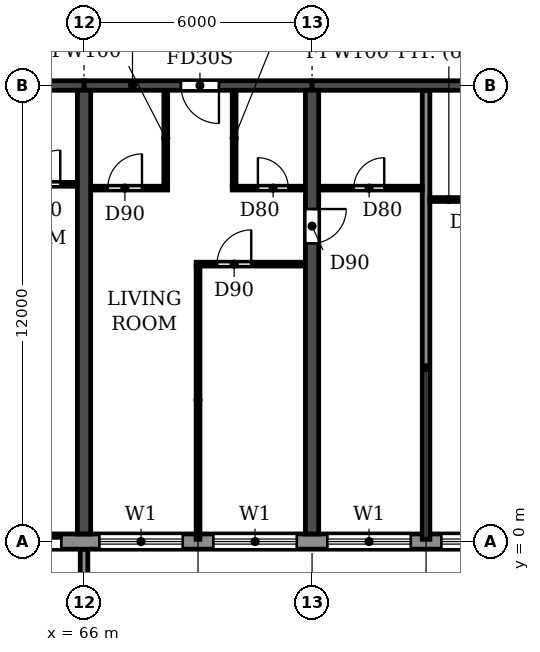
"""IFC4 building model, lengths in metres.
Left out: names, types, materials, properties, quantities, classifications, styles, units other than length and angle.
Written with IfcOpenShell. Run it as: python <this file> out.ifc"""

import sys

from ifc_helpers import new_model, si_unit, direction, frame, frame_2d, origin, place, context, subcontext, project, spatial, polyline, rectangle, outline, extrude, source, transform, mapped, element, fill, save


model = new_model("IFC4")
c1 = context("Model", 3, precision=1e-05, world=origin(), true_north=direction((0.0, 1.0)))
c2 = subcontext(c1, "Body", "Model", "MODEL_VIEW")
j1 = project(units=[si_unit("LENGTHUNIT", "METRE"), si_unit("PLANEANGLEUNIT", "RADIAN")], contexts=[c1])
p1 = place(None, origin())
s1 = spatial("IfcSite", under=j1, at=p1, CompositionType="ELEMENT")
p2 = place(p1, origin())
s2 = spatial("IfcBuilding", under=s1, at=p2, CompositionType="ELEMENT")
p3 = place(p2, frame((0.0, 0.0, 109.2)))
s3 = spatial("IfcBuildingStorey", under=s2, at=p3, CompositionType="ELEMENT", Elevation=109.2)
p4 = place(p3, frame((66.0, 0.2, 0.0), z_axis=(0.0, 0.0, 1.0), x_axis=(0.0, 1.0, 0.0)))
e1 = element("IfcWall", 1, at=p4, inside=s3, PredefinedType="SHEAR", context=c2, shape_type="SweptSolid", body=[
    extrude(rectangle(XDim=11.675, YDim=0.35, at=frame_2d((5.837, 0.0))), origin(), (0.0, 0.0, 1.0), 3.06),
])
p5 = place(p3, frame((72.0, 0.2, 0.0), z_axis=(0.0, 0.0, 1.0), x_axis=(0.0, 1.0, 0.0)))
e2 = element("IfcWall", 2, at=p5, inside=s3, PredefinedType="SHEAR", context=c2, shape_type="SweptSolid", body=[
    extrude(rectangle(XDim=11.675, YDim=0.35, at=frame_2d((5.837, 0.0))), origin(), (0.0, 0.0, 1.0), 3.06),
])
p6 = place(p5, frame((7.65, 0.0, 0.0)))
e3 = element("IfcOpeningElement", 3, at=p6, cuts=e2, PredefinedType="OPENING", context=c2, shape_type="SweptSolid", body=[
    extrude(rectangle(XDim=0.9, YDim=2.1, at=frame_2d((0.45, 1.05))), frame((0.0, 0.185, 0.0), z_axis=(0.0, -1.0, 0.0), x_axis=(1.0, 0.0, 0.0)), (0.0, 0.0, 1.0), 0.37),
])
p7 = place(p3, frame((60.0, 12.0, 0.0), z_axis=(0.0, 0.0, 1.0), x_axis=(1.0, 0.0, 0.0)))
e4 = element("IfcWall", 4, at=p7, inside=s3, PredefinedType="SHEAR", context=c2, shape_type="SweptSolid", body=[
    extrude(rectangle(XDim=6.0, YDim=0.25, at=frame_2d((3.0, 0.0))), origin(), (0.0, 0.0, 1.0), 2.46),
])
p8 = place(p7, frame((2.45, 0.0, 0.0)))
e5 = element("IfcOpeningElement", 5, at=p8, cuts=e4, PredefinedType="OPENING", context=c2, shape_type="SweptSolid", body=[
    extrude(rectangle(XDim=1.0, YDim=2.1, at=frame_2d((0.5, 1.05))), frame((0.0, 0.135, 0.0), z_axis=(0.0, -1.0, 0.0), x_axis=(1.0, 0.0, 0.0)), (0.0, 0.0, 1.0), 0.27),
])
p9 = place(p3, frame((66.0, 12.0, 0.0), z_axis=(0.0, 0.0, 1.0), x_axis=(1.0, 0.0, 0.0)))
e6 = element("IfcWall", 6, at=p9, inside=s3, PredefinedType="SHEAR", context=c2, shape_type="SweptSolid", body=[
    extrude(rectangle(XDim=6.0, YDim=0.25, at=frame_2d((3.0, 0.0))), origin(), (0.0, 0.0, 1.0), 2.46),
])
p10 = place(p9, frame((2.55, 0.0, 0.0)))
e7 = element("IfcOpeningElement", 7, at=p10, cuts=e6, PredefinedType="OPENING", context=c2, shape_type="SweptSolid", body=[
    extrude(rectangle(XDim=1.0, YDim=2.1, at=frame_2d((0.5, 1.05))), frame((0.0, 0.135, 0.0), z_axis=(0.0, -1.0, 0.0), x_axis=(1.0, 0.0, 0.0)), (0.0, 0.0, 1.0), 0.27),
])
p11 = place(p3, frame((72.0, 12.0, 0.0), z_axis=(0.0, 0.0, 1.0), x_axis=(1.0, 0.0, 0.0)))
e8 = element("IfcWall", 8, at=p11, inside=s3, PredefinedType="SHEAR", context=c2, shape_type="SweptSolid", body=[
    extrude(rectangle(XDim=6.0, YDim=0.25, at=frame_2d((3.0, 0.0))), origin(), (0.0, 0.0, 1.0), 2.46),
])
p12 = place(p3, frame((16.683, 0.0, 0.0), z_axis=(0.0, 0.0, 1.0), x_axis=(1.0, 0.0, 0.0)))
e9 = element("IfcWall", 9, at=p12, inside=s3, PredefinedType="STANDARD", context=c2, shape_type="SweptSolid", body=[
    extrude(rectangle(XDim=68.634, YDim=0.4, at=frame_2d((34.317, 0.0))), origin(), (0.0, 0.0, 1.0), 3.06),
])
p13 = place(p12, frame((1.717, 0.0, 0.9)))
e10 = element("IfcOpeningElement", 10, at=p13, cuts=e9, PredefinedType="OPENING", context=c2, shape_type="SweptSolid", body=[
    extrude(rectangle(XDim=2.2, YDim=1.5, at=frame_2d((1.1, 0.75))), frame((0.0, 0.21, 0.0), z_axis=(0.0, -1.0, 0.0), x_axis=(1.0, 0.0, 0.0)), (0.0, 0.0, 1.0), 0.42),
])
p14 = place(p12, frame((4.717, 0.0, 0.9)))
e11 = element("IfcOpeningElement", 11, at=p14, cuts=e9, PredefinedType="OPENING", context=c2, shape_type="SweptSolid", body=[
    extrude(rectangle(XDim=2.2, YDim=1.5, at=frame_2d((1.1, 0.75))), frame((0.0, 0.21, 0.0), z_axis=(0.0, -1.0, 0.0), x_axis=(1.0, 0.0, 0.0)), (0.0, 0.0, 1.0), 0.42),
])
p15 = place(p12, frame((7.717, 0.0, 0.9)))
e12 = element("IfcOpeningElement", 12, at=p15, cuts=e9, PredefinedType="OPENING", context=c2, shape_type="SweptSolid", body=[
    extrude(rectangle(XDim=2.2, YDim=1.5, at=frame_2d((1.1, 0.75))), frame((0.0, 0.21, 0.0), z_axis=(0.0, -1.0, 0.0), x_axis=(1.0, 0.0, 0.0)), (0.0, 0.0, 1.0), 0.42),
])
p16 = place(p12, frame((10.917, 0.0, 0.0)))
e13 = element("IfcOpeningElement", 13, at=p16, cuts=e9, PredefinedType="OPENING", context=c2, shape_type="SweptSolid", body=[
    extrude(rectangle(XDim=1.8, YDim=2.4, at=frame_2d((0.9, 1.2))), frame((0.0, 0.21, 0.0), z_axis=(0.0, -1.0, 0.0), x_axis=(1.0, 0.0, 0.0)), (0.0, 0.0, 1.0), 0.42),
])
p17 = place(p12, frame((13.717, 0.0, 0.9)))
e14 = element("IfcOpeningElement", 14, at=p17, cuts=e9, PredefinedType="OPENING", context=c2, shape_type="SweptSolid", body=[
    extrude(rectangle(XDim=2.2, YDim=1.5, at=frame_2d((1.1, 0.75))), frame((0.0, 0.21, 0.0), z_axis=(0.0, -1.0, 0.0), x_axis=(1.0, 0.0, 0.0)), (0.0, 0.0, 1.0), 0.42),
])
p18 = place(p12, frame((16.717, 0.0, 0.9)))
e15 = element("IfcOpeningElement", 15, at=p18, cuts=e9, PredefinedType="OPENING", context=c2, shape_type="SweptSolid", body=[
    extrude(rectangle(XDim=2.2, YDim=1.5, at=frame_2d((1.1, 0.75))), frame((0.0, 0.21, 0.0), z_axis=(0.0, -1.0, 0.0), x_axis=(1.0, 0.0, 0.0)), (0.0, 0.0, 1.0), 0.42),
])
p19 = place(p12, frame((19.717, 0.0, 0.9)))
e16 = element("IfcOpeningElement", 16, at=p19, cuts=e9, PredefinedType="OPENING", context=c2, shape_type="SweptSolid", body=[
    extrude(rectangle(XDim=2.2, YDim=1.5, at=frame_2d((1.1, 0.75))), frame((0.0, 0.21, 0.0), z_axis=(0.0, -1.0, 0.0), x_axis=(1.0, 0.0, 0.0)), (0.0, 0.0, 1.0), 0.42),
])
p20 = place(p12, frame((22.717, 0.0, 0.9)))
e17 = element("IfcOpeningElement", 17, at=p20, cuts=e9, PredefinedType="OPENING", context=c2, shape_type="SweptSolid", body=[
    extrude(rectangle(XDim=2.2, YDim=1.5, at=frame_2d((1.1, 0.75))), frame((0.0, 0.21, 0.0), z_axis=(0.0, -1.0, 0.0), x_axis=(1.0, 0.0, 0.0)), (0.0, 0.0, 1.0), 0.42),
])
p21 = place(p12, frame((25.717, 0.0, 0.9)))
e18 = element("IfcOpeningElement", 18, at=p21, cuts=e9, PredefinedType="OPENING", context=c2, shape_type="SweptSolid", body=[
    extrude(rectangle(XDim=2.2, YDim=1.5, at=frame_2d((1.1, 0.75))), frame((0.0, 0.21, 0.0), z_axis=(0.0, -1.0, 0.0), x_axis=(1.0, 0.0, 0.0)), (0.0, 0.0, 1.0), 0.42),
])
p22 = place(p12, frame((28.717, 0.0, 0.9)))
e19 = element("IfcOpeningElement", 19, at=p22, cuts=e9, PredefinedType="OPENING", context=c2, shape_type="SweptSolid", body=[
    extrude(rectangle(XDim=2.2, YDim=1.5, at=frame_2d((1.1, 0.75))), frame((0.0, 0.21, 0.0), z_axis=(0.0, -1.0, 0.0), x_axis=(1.0, 0.0, 0.0)), (0.0, 0.0, 1.0), 0.42),
])
p23 = place(p12, frame((31.917, 0.0, 0.0)))
e20 = element("IfcOpeningElement", 20, at=p23, cuts=e9, PredefinedType="OPENING", context=c2, shape_type="SweptSolid", body=[
    extrude(rectangle(XDim=1.8, YDim=2.4, at=frame_2d((0.9, 1.2))), frame((0.0, 0.21, 0.0), z_axis=(0.0, -1.0, 0.0), x_axis=(1.0, 0.0, 0.0)), (0.0, 0.0, 1.0), 0.42),
])
p24 = place(p12, frame((34.717, 0.0, 0.9)))
e21 = element("IfcOpeningElement", 21, at=p24, cuts=e9, PredefinedType="OPENING", context=c2, shape_type="SweptSolid", body=[
    extrude(rectangle(XDim=2.2, YDim=1.5, at=frame_2d((1.1, 0.75))), frame((0.0, 0.21, 0.0), z_axis=(0.0, -1.0, 0.0), x_axis=(1.0, 0.0, 0.0)), (0.0, 0.0, 1.0), 0.42),
])
p25 = place(p12, frame((37.717, 0.0, 0.9)))
e22 = element("IfcOpeningElement", 22, at=p25, cuts=e9, PredefinedType="OPENING", context=c2, shape_type="SweptSolid", body=[
    extrude(rectangle(XDim=2.2, YDim=1.5, at=frame_2d((1.1, 0.75))), frame((0.0, 0.21, 0.0), z_axis=(0.0, -1.0, 0.0), x_axis=(1.0, 0.0, 0.0)), (0.0, 0.0, 1.0), 0.42),
])
p26 = place(p12, frame((40.717, 0.0, 0.9)))
e23 = element("IfcOpeningElement", 23, at=p26, cuts=e9, PredefinedType="OPENING", context=c2, shape_type="SweptSolid", body=[
    extrude(rectangle(XDim=2.2, YDim=1.5, at=frame_2d((1.1, 0.75))), frame((0.0, 0.21, 0.0), z_axis=(0.0, -1.0, 0.0), x_axis=(1.0, 0.0, 0.0)), (0.0, 0.0, 1.0), 0.42),
])
p27 = place(p12, frame((43.717, 0.0, 0.9)))
e24 = element("IfcOpeningElement", 24, at=p27, cuts=e9, PredefinedType="OPENING", context=c2, shape_type="SweptSolid", body=[
    extrude(rectangle(XDim=2.2, YDim=1.5, at=frame_2d((1.1, 0.75))), frame((0.0, 0.21, 0.0), z_axis=(0.0, -1.0, 0.0), x_axis=(1.0, 0.0, 0.0)), (0.0, 0.0, 1.0), 0.42),
])
p28 = place(p12, frame((46.917, 0.0, 0.0)))
e25 = element("IfcOpeningElement", 25, at=p28, cuts=e9, PredefinedType="OPENING", context=c2, shape_type="SweptSolid", body=[
    extrude(rectangle(XDim=1.8, YDim=2.4, at=frame_2d((0.9, 1.2))), frame((0.0, 0.21, 0.0), z_axis=(0.0, -1.0, 0.0), x_axis=(1.0, 0.0, 0.0)), (0.0, 0.0, 1.0), 0.42),
])
p29 = place(p12, frame((49.717, 0.0, 0.9)))
e26 = element("IfcOpeningElement", 26, at=p29, cuts=e9, PredefinedType="OPENING", context=c2, shape_type="SweptSolid", body=[
    extrude(rectangle(XDim=2.2, YDim=1.5, at=frame_2d((1.1, 0.75))), frame((0.0, 0.21, 0.0), z_axis=(0.0, -1.0, 0.0), x_axis=(1.0, 0.0, 0.0)), (0.0, 0.0, 1.0), 0.42),
])
p30 = place(p12, frame((52.717, 0.0, 0.9)))
e27 = element("IfcOpeningElement", 27, at=p30, cuts=e9, PredefinedType="OPENING", context=c2, shape_type="SweptSolid", body=[
    extrude(rectangle(XDim=2.2, YDim=1.5, at=frame_2d((1.1, 0.75))), frame((0.0, 0.21, 0.0), z_axis=(0.0, -1.0, 0.0), x_axis=(1.0, 0.0, 0.0)), (0.0, 0.0, 1.0), 0.42),
])
p31 = place(p12, frame((55.717, 0.0, 0.9)))
e28 = element("IfcOpeningElement", 28, at=p31, cuts=e9, PredefinedType="OPENING", context=c2, shape_type="SweptSolid", body=[
    extrude(rectangle(XDim=2.2, YDim=1.5, at=frame_2d((1.1, 0.75))), frame((0.0, 0.21, 0.0), z_axis=(0.0, -1.0, 0.0), x_axis=(1.0, 0.0, 0.0)), (0.0, 0.0, 1.0), 0.42),
])
p32 = place(p12, frame((58.717, 0.0, 0.9)))
e29 = element("IfcOpeningElement", 29, at=p32, cuts=e9, PredefinedType="OPENING", context=c2, shape_type="SweptSolid", body=[
    extrude(rectangle(XDim=2.2, YDim=1.5, at=frame_2d((1.1, 0.75))), frame((0.0, 0.21, 0.0), z_axis=(0.0, -1.0, 0.0), x_axis=(1.0, 0.0, 0.0)), (0.0, 0.0, 1.0), 0.42),
])
p33 = place(p12, frame((61.717, 0.0, 0.9)))
e30 = element("IfcOpeningElement", 30, at=p33, cuts=e9, PredefinedType="OPENING", context=c2, shape_type="SweptSolid", body=[
    extrude(rectangle(XDim=2.2, YDim=1.5, at=frame_2d((1.1, 0.75))), frame((0.0, 0.21, 0.0), z_axis=(0.0, -1.0, 0.0), x_axis=(1.0, 0.0, 0.0)), (0.0, 0.0, 1.0), 0.42),
])
p34 = place(p12, frame((64.717, 0.0, 0.9)))
e31 = element("IfcOpeningElement", 31, at=p34, cuts=e9, PredefinedType="OPENING", context=c2, shape_type="SweptSolid", body=[
    extrude(rectangle(XDim=2.2, YDim=1.5, at=frame_2d((1.1, 0.75))), frame((0.0, 0.21, 0.0), z_axis=(0.0, -1.0, 0.0), x_axis=(1.0, 0.0, 0.0)), (0.0, 0.0, 1.0), 0.42),
])
m1 = source(origin(), c2, "Body", "SweptSolid", [
    extrude(outline(polyline([(0.0, 0.0), (0.2, 0.0), (0.2, 1.65), (0.0, 1.65), (0.0, 0.0)])), origin(), (0.0, 0.0, 1.0), 3.1),
])
p35 = place(p3, frame((65.9, -1.85, 0.0)))
e32 = element("IfcWall", 32, at=p35, inside=s3, PredefinedType="STANDARD", context=c2, shape_type="MappedRepresentation", body=[
    mapped(m1, transform((0.0, 0.0, 0.0))),
])
p36 = place(p3, frame((75.0, 0.06, 0.0), z_axis=(0.0, 0.0, 1.0), x_axis=(0.0, 1.0, 0.0)))
e33 = element("IfcWall", 33, at=p36, inside=s3, PredefinedType="PARTITIONING", context=c2, shape_type="SweptSolid", body=[
    extrude(rectangle(XDim=11.805, YDim=0.2, at=frame_2d((5.902, 0.0))), origin(), (0.0, 0.0, 1.0), 3.06),
])
p37 = place(p3, frame((68.95, 7.3, 0.0), z_axis=(0.0, 0.0, 1.0), x_axis=(1.0, 0.0, 0.0)))
e34 = element("IfcWall", 34, at=p37, inside=s3, PredefinedType="PARTITIONING", context=c2, shape_type="SweptSolid", body=[
    extrude(rectangle(XDim=2.865, YDim=0.1, at=frame_2d((1.433, 0.0))), origin(), (0.0, 0.0, 1.0), 3.06),
])
p38 = place(p37, frame((0.55, 0.0, 0.0)))
e35 = element("IfcOpeningElement", 35, at=p38, cuts=e34, PredefinedType="OPENING", context=c2, shape_type="SweptSolid", body=[
    extrude(rectangle(XDim=0.9, YDim=2.1, at=frame_2d((0.45, 1.05))), frame((0.0, 0.06, 0.0), z_axis=(0.0, -1.0, 0.0), x_axis=(1.0, 0.0, 0.0)), (0.0, 0.0, 1.0), 0.12),
])
p39 = place(p3, frame((75.1, 9.0, 0.0), z_axis=(0.0, 0.0, 1.0), x_axis=(1.0, 0.0, 0.0)))
e36 = element("IfcWall", 36, at=p39, inside=s3, PredefinedType="PARTITIONING", context=c2, shape_type="SweptSolid", body=[
    extrude(rectangle(XDim=2.715, YDim=0.1, at=frame_2d((1.357, 0.0))), origin(), (0.0, 0.0, 1.0), 3.06),
])
p40 = place(p39, frame((1.0, 0.0, 0.0)))
e37 = element("IfcOpeningElement", 37, at=p40, cuts=e36, PredefinedType="OPENING", context=c2, shape_type="SweptSolid", body=[
    extrude(rectangle(XDim=0.8, YDim=2.1, at=frame_2d((0.4, 1.05))), frame((0.0, 0.06, 0.0), z_axis=(0.0, -1.0, 0.0), x_axis=(1.0, 0.0, 0.0)), (0.0, 0.0, 1.0), 0.12),
])
p41 = place(p3, frame((66.185, 9.3, 0.0), z_axis=(0.0, 0.0, 1.0), x_axis=(1.0, 0.0, 0.0)))
e38 = element("IfcWall", 38, at=p41, inside=s3, PredefinedType="PARTITIONING", context=c2, shape_type="SweptSolid", body=[
    extrude(rectangle(XDim=2.015, YDim=0.1, at=frame_2d((1.007, 0.0))), origin(), (0.0, 0.0, 1.0), 3.06),
])
p42 = place(p41, frame((0.44, 0.0, 0.0)))
e39 = element("IfcOpeningElement", 39, at=p42, cuts=e38, PredefinedType="OPENING", context=c2, shape_type="SweptSolid", body=[
    extrude(rectangle(XDim=0.9, YDim=2.1, at=frame_2d((0.45, 1.05))), frame((0.0, 0.06, 0.0), z_axis=(0.0, -1.0, 0.0), x_axis=(1.0, 0.0, 0.0)), (0.0, 0.0, 1.0), 0.12),
])
p43 = place(p3, frame((69.9, 9.3, 0.0), z_axis=(0.0, 0.0, 1.0), x_axis=(1.0, 0.0, 0.0)))
e40 = element("IfcWall", 40, at=p43, inside=s3, PredefinedType="PARTITIONING", context=c2, shape_type="SweptSolid", body=[
    extrude(rectangle(XDim=1.915, YDim=0.1, at=frame_2d((0.958, 0.0))), origin(), (0.0, 0.0, 1.0), 3.06),
])
p44 = place(p43, frame((0.675, 0.0, 0.0)))
e41 = element("IfcOpeningElement", 41, at=p44, cuts=e40, PredefinedType="OPENING", context=c2, shape_type="SweptSolid", body=[
    extrude(rectangle(XDim=0.8, YDim=2.1, at=frame_2d((0.4, 1.05))), frame((0.0, 0.06, 0.0), z_axis=(0.0, -1.0, 0.0), x_axis=(1.0, 0.0, 0.0)), (0.0, 0.0, 1.0), 0.12),
])
p45 = place(p3, frame((72.185, 9.3, 0.0), z_axis=(0.0, 0.0, 1.0), x_axis=(1.0, 0.0, 0.0)))
e42 = element("IfcWall", 42, at=p45, inside=s3, PredefinedType="PARTITIONING", context=c2, shape_type="SweptSolid", body=[
    extrude(rectangle(XDim=2.715, YDim=0.1, at=frame_2d((1.357, 0.0))), origin(), (0.0, 0.0, 1.0), 3.06),
])
p46 = place(p45, frame((0.915, 0.0, 0.0)))
e43 = element("IfcOpeningElement", 43, at=p46, cuts=e42, PredefinedType="OPENING", context=c2, shape_type="SweptSolid", body=[
    extrude(rectangle(XDim=0.8, YDim=2.1, at=frame_2d((0.4, 1.05))), frame((0.0, 0.06, 0.0), z_axis=(0.0, -1.0, 0.0), x_axis=(1.0, 0.0, 0.0)), (0.0, 0.0, 1.0), 0.12),
])
p47 = place(p3, frame((63.8, 9.4, 0.0), z_axis=(0.0, 0.0, 1.0), x_axis=(1.0, 0.0, 0.0)))
e44 = element("IfcWall", 44, at=p47, inside=s3, PredefinedType="PARTITIONING", context=c2, shape_type="SweptSolid", body=[
    extrude(rectangle(XDim=2.015, YDim=0.1, at=frame_2d((1.007, 0.0))), origin(), (0.0, 0.0, 1.0), 3.06),
])
p48 = place(p47, frame((0.675, 0.0, 0.0)))
e45 = element("IfcOpeningElement", 45, at=p48, cuts=e44, PredefinedType="OPENING", context=c2, shape_type="SweptSolid", body=[
    extrude(rectangle(XDim=0.9, YDim=2.1, at=frame_2d((0.45, 1.05))), frame((0.0, 0.06, 0.0), z_axis=(0.0, -1.0, 0.0), x_axis=(1.0, 0.0, 0.0)), (0.0, 0.0, 1.0), 0.12),
])
p49 = place(p3, frame((68.15, 9.35, 0.0), z_axis=(0.0, 0.0, 1.0), x_axis=(0.0, 1.0, 0.0)))
e46 = element("IfcWall", 46, at=p49, inside=s3, PredefinedType="PARTITIONING", context=c2, shape_type="SweptSolid", body=[
    extrude(rectangle(XDim=2.515, YDim=0.1, at=frame_2d((1.257, 0.0))), origin(), (0.0, 0.0, 1.0), 3.06),
])
p50 = place(p3, frame((69.0, 0.06, 0.0), z_axis=(0.0, 0.0, 1.0), x_axis=(0.0, 1.0, 0.0)))
e47 = element("IfcWall", 47, at=p50, inside=s3, PredefinedType="PARTITIONING", context=c2, shape_type="SweptSolid", body=[
    extrude(rectangle(XDim=7.19, YDim=0.1, at=frame_2d((3.595, 0.0))), origin(), (0.0, 0.0, 1.0), 3.06),
])
p51 = place(p3, frame((69.95, 9.35, 0.0), z_axis=(0.0, 0.0, 1.0), x_axis=(0.0, 1.0, 0.0)))
e48 = element("IfcWall", 48, at=p51, inside=s3, PredefinedType="PARTITIONING", context=c2, shape_type="SweptSolid", body=[
    extrude(rectangle(XDim=2.515, YDim=0.1, at=frame_2d((1.257, 0.0))), origin(), (0.0, 0.0, 1.0), 3.06),
])
p52 = place(p28, origin())
e49 = element("IfcDoor", 49, at=p52, inside=s3, OperationType="DOUBLE_DOOR_SLIDING", PredefinedType="DOOR", context=c2, shape_type="SweptSolid", body=[
    extrude(rectangle(XDim=1.8, YDim=2.4, at=frame_2d((0.9, 1.2))), frame((0.0, 0.025, 0.0), z_axis=(0.0, -1.0, 0.0), x_axis=(1.0, 0.0, 0.0)), (0.0, 0.0, 1.0), 0.05),
])
fill(e25, e49)
p53 = place(p29, origin())
e50 = element("IfcWindow", 50, at=p53, inside=s3, PartitioningType="DOUBLE_PANEL_HORIZONTAL", PredefinedType="WINDOW", context=c2, shape_type="SweptSolid", body=[
    extrude(rectangle(XDim=2.2, YDim=1.5, at=frame_2d((1.1, 0.75))), frame((0.0, 0.03, 0.0), z_axis=(0.0, -1.0, 0.0), x_axis=(1.0, 0.0, 0.0)), (0.0, 0.0, 1.0), 0.06),
])
fill(e26, e50)
p54 = place(p30, origin())
e51 = element("IfcWindow", 51, at=p54, inside=s3, PartitioningType="DOUBLE_PANEL_HORIZONTAL", PredefinedType="WINDOW", context=c2, shape_type="SweptSolid", body=[
    extrude(rectangle(XDim=2.2, YDim=1.5, at=frame_2d((1.1, 0.75))), frame((0.0, 0.03, 0.0), z_axis=(0.0, -1.0, 0.0), x_axis=(1.0, 0.0, 0.0)), (0.0, 0.0, 1.0), 0.06),
])
fill(e27, e51)
p55 = place(p31, origin())
e52 = element("IfcWindow", 52, at=p55, inside=s3, PartitioningType="DOUBLE_PANEL_HORIZONTAL", PredefinedType="WINDOW", context=c2, shape_type="SweptSolid", body=[
    extrude(rectangle(XDim=2.2, YDim=1.5, at=frame_2d((1.1, 0.75))), frame((0.0, 0.03, 0.0), z_axis=(0.0, -1.0, 0.0), x_axis=(1.0, 0.0, 0.0)), (0.0, 0.0, 1.0), 0.06),
])
fill(e28, e52)
p56 = place(p32, origin())
e53 = element("IfcWindow", 53, at=p56, inside=s3, PartitioningType="DOUBLE_PANEL_HORIZONTAL", PredefinedType="WINDOW", context=c2, shape_type="SweptSolid", body=[
    extrude(rectangle(XDim=2.2, YDim=1.5, at=frame_2d((1.1, 0.75))), frame((0.0, 0.03, 0.0), z_axis=(0.0, -1.0, 0.0), x_axis=(1.0, 0.0, 0.0)), (0.0, 0.0, 1.0), 0.06),
])
fill(e29, e53)
p57 = place(p48, origin())
e54 = element("IfcDoor", 54, at=p57, inside=s3, OperationType="SINGLE_SWING_RIGHT", PredefinedType="DOOR", context=c2, shape_type="SweptSolid", body=[
    extrude(rectangle(XDim=0.9, YDim=2.1, at=frame_2d((0.45, 1.05))), frame((0.0, 0.025, 0.0), z_axis=(0.0, -1.0, 0.0), x_axis=(1.0, 0.0, 0.0)), (0.0, 0.0, 1.0), 0.05),
])
fill(e45, e54)
p58 = place(p46, origin())
e55 = element("IfcDoor", 55, at=p58, inside=s3, OperationType="SINGLE_SWING_RIGHT", PredefinedType="DOOR", context=c2, shape_type="SweptSolid", body=[
    extrude(rectangle(XDim=0.8, YDim=2.1, at=frame_2d((0.4, 1.05))), frame((0.0, 0.025, 0.0), z_axis=(0.0, -1.0, 0.0), x_axis=(1.0, 0.0, 0.0)), (0.0, 0.0, 1.0), 0.05),
])
fill(e43, e55)
p59 = place(p42, origin())
e56 = element("IfcDoor", 56, at=p59, inside=s3, OperationType="SINGLE_SWING_RIGHT", PredefinedType="DOOR", context=c2, shape_type="SweptSolid", body=[
    extrude(rectangle(XDim=0.9, YDim=2.1, at=frame_2d((0.45, 1.05))), frame((0.0, 0.025, 0.0), z_axis=(0.0, -1.0, 0.0), x_axis=(1.0, 0.0, 0.0)), (0.0, 0.0, 1.0), 0.05),
])
fill(e39, e56)
p60 = place(p10, frame((1.0, 0.0, 0.0), z_axis=(0.0, 0.0, 1.0), x_axis=(-1.0, 0.0, 0.0)))
e57 = element("IfcDoor", 57, at=p60, inside=s3, OperationType="SINGLE_SWING_LEFT", PredefinedType="DOOR", context=c2, shape_type="SweptSolid", body=[
    extrude(rectangle(XDim=1.0, YDim=2.1, at=frame_2d((0.5, 1.05))), frame((0.0, 0.025, 0.0), z_axis=(0.0, -1.0, 0.0), x_axis=(1.0, 0.0, 0.0)), (0.0, 0.0, 1.0), 0.05),
])
fill(e7, e57)
p61 = place(p38, origin())
e58 = element("IfcDoor", 58, at=p61, inside=s3, OperationType="SINGLE_SWING_RIGHT", PredefinedType="DOOR", context=c2, shape_type="SweptSolid", body=[
    extrude(rectangle(XDim=0.9, YDim=2.1, at=frame_2d((0.45, 1.05))), frame((0.0, 0.025, 0.0), z_axis=(0.0, -1.0, 0.0), x_axis=(1.0, 0.0, 0.0)), (0.0, 0.0, 1.0), 0.05),
])
fill(e35, e58)
p62 = place(p44, origin())
e59 = element("IfcDoor", 59, at=p62, inside=s3, OperationType="SINGLE_SWING_LEFT", PredefinedType="DOOR", context=c2, shape_type="SweptSolid", body=[
    extrude(rectangle(XDim=0.8, YDim=2.1, at=frame_2d((0.4, 1.05))), frame((0.0, 0.025, 0.0), z_axis=(0.0, -1.0, 0.0), x_axis=(1.0, 0.0, 0.0)), (0.0, 0.0, 1.0), 0.05),
])
fill(e41, e59)
p63 = place(p6, frame((0.9, 0.0, 0.0), z_axis=(0.0, 0.0, 1.0), x_axis=(-1.0, 0.0, 0.0)))
e60 = element("IfcDoor", 60, at=p63, inside=s3, OperationType="SINGLE_SWING_LEFT", PredefinedType="DOOR", context=c2, shape_type="SweptSolid", body=[
    extrude(rectangle(XDim=0.9, YDim=2.1, at=frame_2d((0.45, 1.05))), frame((0.0, 0.025, 0.0), z_axis=(0.0, -1.0, 0.0), x_axis=(1.0, 0.0, 0.0)), (0.0, 0.0, 1.0), 0.05),
])
fill(e3, e60)
save(model, sys.argv[1])
